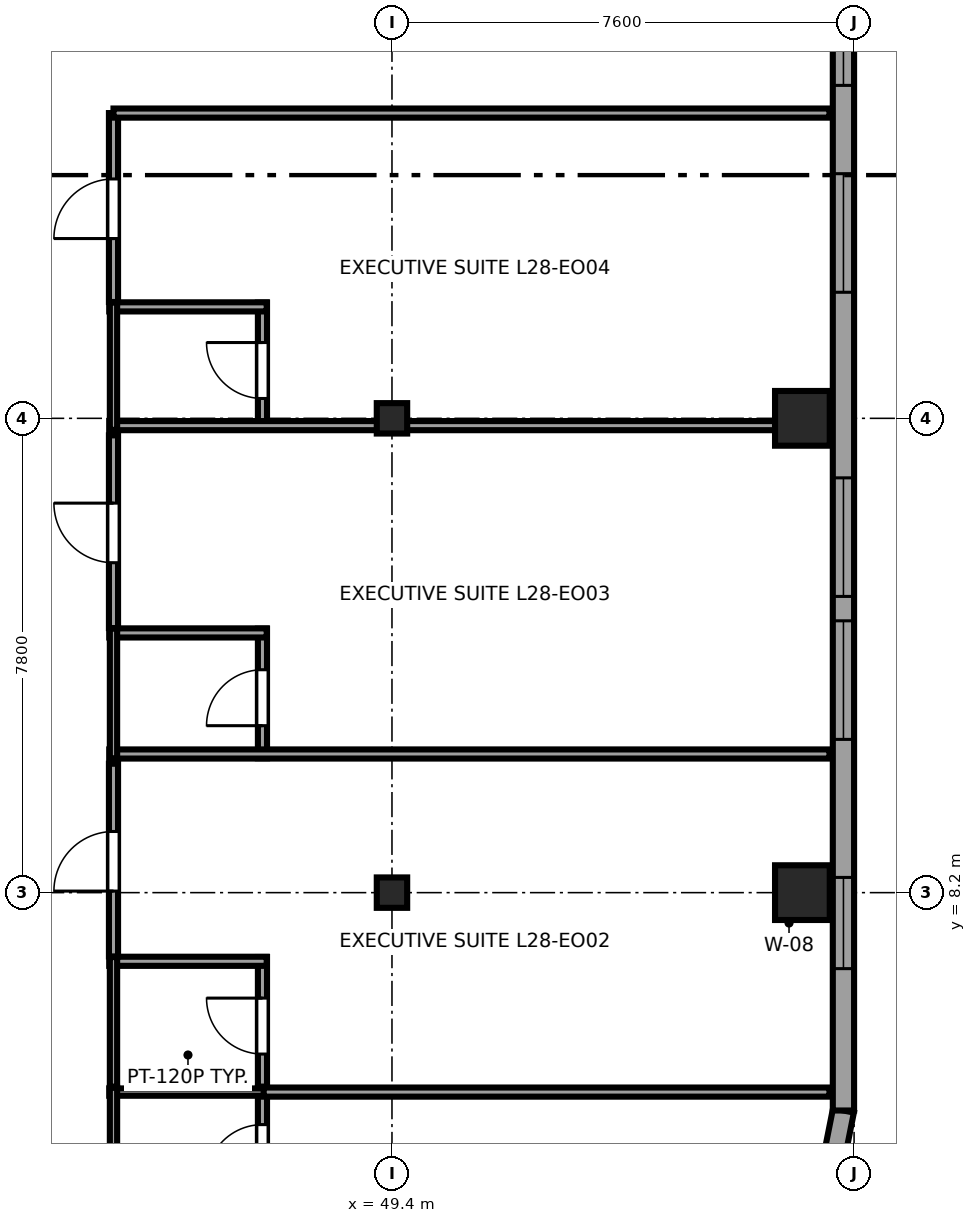
"""IFC4 building model, lengths in metres.
Left out: names, types, materials, properties, quantities, classifications, styles, units other than length and angle.
Written with IfcOpenShell. Run it as: python <this file> out.ifc"""

import sys

from ifc_helpers import new_model, si_unit, direction, frame, frame_2d, origin, origin_2d, place, context, subcontext, project, spatial, rectangle, i_section, extrude, source, transform, mapped, element, fill, save


model = new_model("IFC4")
c1 = context("Model", 3, precision=1e-05, world=origin(), true_north=direction((0.0, 1.0)))
c2 = subcontext(c1, "Body", "Model", "MODEL_VIEW")
j1 = project(units=[si_unit("LENGTHUNIT", "METRE"), si_unit("PLANEANGLEUNIT", "RADIAN")], contexts=[c1])
p1 = place(None, origin())
s1 = spatial("IfcSite", under=j1, at=p1, CompositionType="ELEMENT")
p2 = place(p1, origin())
s2 = spatial("IfcBuilding", under=s1, at=p2, CompositionType="ELEMENT")
p3 = place(p2, frame((0.0, 0.0, 111.55)))
s3 = spatial("IfcBuildingStorey", under=s2, at=p3, CompositionType="ELEMENT", Elevation=111.55)
m1 = source(origin(), c2, "Body", "SweptSolid", [
    extrude(i_section(OverallWidth=0.5, OverallDepth=0.5, WebThickness=0.022, FlangeThickness=0.034, at=origin_2d()), origin(), (0.0, 0.0, 1.0), 3.55),
])
for number, where, z_axis, x_axis in (
    (1, (49.4, 8.2, 0.0), (0.0, 0.0, 1.0), (1.0, 0.0, 0.0)),
    (2, (49.4, 16.0, 0.0), (0.0, 0.0, 1.0), (1.0, 0.0, 0.0)),
):
    element("IfcColumn", number, at=place(p3, frame(where, z_axis=z_axis, x_axis=x_axis)), inside=s3, PredefinedType="COLUMN", context=c2, shape_type="MappedRepresentation", body=[
        mapped(m1, transform((0.0, 0.0, 0.0), x_axis=(1.0, 0.0, 0.0), y_axis=(0.0, 1.0, 0.0), z_axis=(0.0, 0.0, 1.0), scale=1.0)),
    ])
m2 = source(origin(), c2, "Body", "SweptSolid", [
    extrude(rectangle(XDim=0.9, YDim=0.9, at=origin_2d()), origin(), (0.0, 0.0, 1.0), 3.55),
])
for number, where, z_axis, x_axis in (
    (3, (56.15, 8.2, 0.0), (0.0, 0.0, 1.0), (1.0, 0.0, 0.0)),
    (4, (56.15, 16.0, 0.0), (0.0, 0.0, 1.0), (1.0, 0.0, 0.0)),
):
    element("IfcColumn", number, at=place(p3, frame(where, z_axis=z_axis, x_axis=x_axis)), inside=s3, PredefinedType="COLUMN", context=c2, shape_type="MappedRepresentation", body=[
        mapped(m2, transform((0.0, 0.0, 0.0), x_axis=(1.0, 0.0, 0.0), y_axis=(0.0, 1.0, 0.0), z_axis=(0.0, 0.0, 1.0), scale=1.0)),
    ])
p4 = place(p3, frame((56.485, 2.908, 0.0), z_axis=(0.0, 0.0, 1.0), x_axis=(0.195011420161, 0.980800971659, 0.0)))
e5 = element("IfcWall", 5, at=p4, inside=s3, PredefinedType="SOLIDWALL", context=c2, shape_type="SweptSolid", body=[
    extrude(rectangle(XDim=1.743, YDim=0.35, at=frame_2d((0.871, 0.0))), origin(), (0.0, 0.0, 1.0), 3.37),
])
p5 = place(p3, frame((56.825, 4.617, 0.0), z_axis=(0.0, 0.0, 1.0), x_axis=(0.0, 1.0, 0.0)))
e6 = element("IfcWall", 6, at=p5, inside=s3, PredefinedType="SOLIDWALL", context=c2, shape_type="SweptSolid", body=[
    extrude(rectangle(XDim=36.766, YDim=0.35, at=frame_2d((18.383, 0.0))), origin(), (0.0, 0.0, 1.0), 3.37),
])
p6 = place(p5, frame((6.103, 0.0, 0.68)))
e7 = element("IfcOpeningElement", 7, at=p6, cuts=e6, PredefinedType="OPENING", context=c2, shape_type="SweptSolid", body=[
    extrude(rectangle(XDim=1.95, YDim=1.82, at=frame_2d((0.975, 0.91))), frame((0.0, 0.185, 0.0), z_axis=(0.0, -1.0, 0.0), x_axis=(1.0, 0.0, 0.0)), (0.0, 0.0, 1.0), 0.37),
])
p7 = place(p5, frame((8.454, 0.0, 0.68)))
e8 = element("IfcOpeningElement", 8, at=p7, cuts=e6, PredefinedType="OPENING", context=c2, shape_type="SweptSolid", body=[
    extrude(rectangle(XDim=1.95, YDim=1.82, at=frame_2d((0.975, 0.91))), frame((0.0, 0.185, 0.0), z_axis=(0.0, -1.0, 0.0), x_axis=(1.0, 0.0, 0.0)), (0.0, 0.0, 1.0), 0.37),
])
p8 = place(p5, frame((13.456, 0.0, 0.68)))
e9 = element("IfcOpeningElement", 9, at=p8, cuts=e6, PredefinedType="OPENING", context=c2, shape_type="SweptSolid", body=[
    extrude(rectangle(XDim=1.95, YDim=1.82, at=frame_2d((0.975, 0.91))), frame((0.0, 0.185, 0.0), z_axis=(0.0, -1.0, 0.0), x_axis=(1.0, 0.0, 0.0)), (0.0, 0.0, 1.0), 0.37),
])
p9 = place(p5, frame((16.858, 0.0, 0.68)))
e10 = element("IfcOpeningElement", 10, at=p9, cuts=e6, PredefinedType="OPENING", context=c2, shape_type="SweptSolid", body=[
    extrude(rectangle(XDim=1.95, YDim=1.82, at=frame_2d((0.975, 0.91))), frame((0.0, 0.185, 0.0), z_axis=(0.0, -1.0, 0.0), x_axis=(1.0, 0.0, 0.0)), (0.0, 0.0, 1.0), 0.37),
])
p10 = place(p5, frame((25.311, 0.0, 0.68)))
e11 = element("IfcOpeningElement", 11, at=p10, cuts=e6, PredefinedType="OPENING", context=c2, shape_type="SweptSolid", body=[
    extrude(rectangle(XDim=1.95, YDim=1.82, at=frame_2d((0.975, 0.91))), frame((0.0, 0.185, 0.0), z_axis=(0.0, -1.0, 0.0), x_axis=(1.0, 0.0, 0.0)), (0.0, 0.0, 1.0), 0.37),
])
p11 = place(p5, frame((2.333, 0.0, 0.62)))
e12 = element("IfcOpeningElement", 12, at=p11, cuts=e6, PredefinedType="OPENING", context=c2, shape_type="SweptSolid", body=[
    extrude(rectangle(XDim=1.5, YDim=1.55, at=frame_2d((0.75, 0.775))), frame((0.0, 0.185, 0.0), z_axis=(0.0, -1.0, 0.0), x_axis=(1.0, 0.0, 0.0)), (0.0, 0.0, 1.0), 0.37),
])
p12 = place(p3, frame((47.27, 3.0, 0.0), z_axis=(0.0, 0.0, 1.0), x_axis=(0.0, 1.0, 0.0)))
e13 = element("IfcWall", 13, at=p12, inside=s3, PredefinedType="PARTITIONING", context=c2, shape_type="SweptSolid", body=[
    extrude(rectangle(XDim=1.99, YDim=0.15, at=frame_2d((0.995, 0.0))), origin(), (0.0, 0.0, 1.0), 3.37),
])
p13 = place(p12, frame((0.465, 0.0, 0.0)))
e14 = element("IfcOpeningElement", 14, at=p13, cuts=e13, PredefinedType="OPENING", context=c2, shape_type="SweptSolid", body=[
    extrude(rectangle(XDim=0.92, YDim=2.01, at=frame_2d((0.46, 1.005))), frame((0.0, 0.085, 0.0), z_axis=(0.0, -1.0, 0.0), x_axis=(1.0, 0.0, 0.0)), (0.0, 0.0, 1.0), 0.17),
])
p14 = place(p3, frame((44.75, 4.92, 0.0), z_axis=(0.0, 0.0, 1.0), x_axis=(1.0, 0.0, 0.0)))
e15 = element("IfcWall", 15, at=p14, inside=s3, PredefinedType="PLUMBINGWALL", context=c2, shape_type="SweptSolid", body=[
    extrude(rectangle(XDim=2.59, YDim=0.12, at=frame_2d((1.295, 0.0))), origin(), (0.0, 0.0, 1.0), 3.37),
])
p15 = place(p3, frame((44.82, 3.0, 0.0), z_axis=(0.0, 0.0, 1.0), x_axis=(0.0, 1.0, 0.0)))
e16 = element("IfcWall", 16, at=p15, inside=s3, PredefinedType="PLUMBINGWALL", context=c2, shape_type="SweptSolid", body=[
    extrude(rectangle(XDim=1.99, YDim=0.12, at=frame_2d((0.995, 0.0))), origin(), (0.0, 0.0, 1.0), 3.37),
])
p16 = place(p3, frame((47.27, 5.01, 0.0), z_axis=(0.0, 0.0, 1.0), x_axis=(0.0, 1.0, 0.0)))
e17 = element("IfcWall", 17, at=p16, inside=s3, PredefinedType="PARTITIONING", context=c2, shape_type="SweptSolid", body=[
    extrude(rectangle(XDim=2.131, YDim=0.15, at=frame_2d((1.065, 0.0))), origin(), (0.0, 0.0, 1.0), 3.37),
])
p17 = place(p16, frame((0.535, 0.0, 0.0)))
e18 = element("IfcOpeningElement", 18, at=p17, cuts=e17, PredefinedType="OPENING", context=c2, shape_type="SweptSolid", body=[
    extrude(rectangle(XDim=0.92, YDim=2.01, at=frame_2d((0.46, 1.005))), frame((0.0, 0.085, 0.0), z_axis=(0.0, -1.0, 0.0), x_axis=(1.0, 0.0, 0.0)), (0.0, 0.0, 1.0), 0.17),
])
p18 = place(p3, frame((44.75, 7.071, 0.0), z_axis=(0.0, 0.0, 1.0), x_axis=(1.0, 0.0, 0.0)))
e19 = element("IfcWall", 19, at=p18, inside=s3, PredefinedType="PARTITIONING", context=c2, shape_type="SweptSolid", body=[
    extrude(rectangle(XDim=2.59, YDim=0.15, at=frame_2d((1.295, 0.0))), origin(), (0.0, 0.0, 1.0), 3.37),
])
p19 = place(p3, frame((44.82, 5.01, 0.0), z_axis=(0.0, 0.0, 1.0), x_axis=(0.0, 1.0, 0.0)))
e20 = element("IfcWall", 20, at=p19, inside=s3, PredefinedType="PLUMBINGWALL", context=c2, shape_type="SweptSolid", body=[
    extrude(rectangle(XDim=2.131, YDim=0.12, at=frame_2d((1.065, 0.0))), origin(), (0.0, 0.0, 1.0), 3.37),
])
p20 = place(p3, frame((47.27, 10.41, 0.0), z_axis=(0.0, 0.0, 1.0), x_axis=(0.0, 1.0, 0.0)))
e21 = element("IfcWall", 21, at=p20, inside=s3, PredefinedType="PARTITIONING", context=c2, shape_type="SweptSolid", body=[
    extrude(rectangle(XDim=2.131, YDim=0.15, at=frame_2d((1.065, 0.0))), origin(), (0.0, 0.0, 1.0), 3.37),
])
p21 = place(p20, frame((0.535, 0.0, 0.0)))
e22 = element("IfcOpeningElement", 22, at=p21, cuts=e21, PredefinedType="OPENING", context=c2, shape_type="SweptSolid", body=[
    extrude(rectangle(XDim=0.92, YDim=2.01, at=frame_2d((0.46, 1.005))), frame((0.0, 0.085, 0.0), z_axis=(0.0, -1.0, 0.0), x_axis=(1.0, 0.0, 0.0)), (0.0, 0.0, 1.0), 0.17),
])
p22 = place(p3, frame((44.75, 10.48, 0.0), z_axis=(0.0, 0.0, 1.0), x_axis=(1.0, 0.0, 0.0)))
e23 = element("IfcWall", 23, at=p22, inside=s3, PredefinedType="PARTITIONING", context=c2, shape_type="SweptSolid", body=[
    extrude(rectangle(XDim=11.845, YDim=0.15, at=frame_2d((5.922, 0.0))), origin(), (0.0, 0.0, 1.0), 3.37),
])
p23 = place(p3, frame((44.75, 12.471, 0.0), z_axis=(0.0, 0.0, 1.0), x_axis=(1.0, 0.0, 0.0)))
e24 = element("IfcWall", 24, at=p23, inside=s3, PredefinedType="PARTITIONING", context=c2, shape_type="SweptSolid", body=[
    extrude(rectangle(XDim=2.59, YDim=0.15, at=frame_2d((1.295, 0.0))), origin(), (0.0, 0.0, 1.0), 3.37),
])
p24 = place(p3, frame((44.82, 10.41, 0.0), z_axis=(0.0, 0.0, 1.0), x_axis=(0.0, 1.0, 0.0)))
e25 = element("IfcWall", 25, at=p24, inside=s3, PredefinedType="PLUMBINGWALL", context=c2, shape_type="SweptSolid", body=[
    extrude(rectangle(XDim=2.131, YDim=0.12, at=frame_2d((1.065, 0.0))), origin(), (0.0, 0.0, 1.0), 3.37),
])
p25 = place(p3, frame((47.27, 15.81, 0.0), z_axis=(0.0, 0.0, 1.0), x_axis=(0.0, 1.0, 0.0)))
e26 = element("IfcWall", 26, at=p25, inside=s3, PredefinedType="PARTITIONING", context=c2, shape_type="SweptSolid", body=[
    extrude(rectangle(XDim=2.093, YDim=0.15, at=frame_2d((1.046, 0.0))), origin(), (0.0, 0.0, 1.0), 3.37),
])
p26 = place(p25, frame((0.517, 0.0, 0.0)))
e27 = element("IfcOpeningElement", 27, at=p26, cuts=e26, PredefinedType="OPENING", context=c2, shape_type="SweptSolid", body=[
    extrude(rectangle(XDim=0.92, YDim=2.01, at=frame_2d((0.46, 1.005))), frame((0.0, 0.085, 0.0), z_axis=(0.0, -1.0, 0.0), x_axis=(1.0, 0.0, 0.0)), (0.0, 0.0, 1.0), 0.17),
])
p27 = place(p3, frame((44.75, 15.88, 0.0), z_axis=(0.0, 0.0, 1.0), x_axis=(1.0, 0.0, 0.0)))
e28 = element("IfcWall", 28, at=p27, inside=s3, PredefinedType="PARTITIONING", context=c2, shape_type="SweptSolid", body=[
    extrude(rectangle(XDim=11.845, YDim=0.15, at=frame_2d((5.922, 0.0))), origin(), (0.0, 0.0, 1.0), 2.748),
])
p28 = place(p3, frame((44.75, 17.833, 0.0), z_axis=(0.0, 0.0, 1.0), x_axis=(1.0, 0.0, 0.0)))
e29 = element("IfcWall", 29, at=p28, inside=s3, PredefinedType="PARTITIONING", context=c2, shape_type="SweptSolid", body=[
    extrude(rectangle(XDim=2.59, YDim=0.15, at=frame_2d((1.295, 0.0))), origin(), (0.0, 0.0, 1.0), 3.37),
])
p29 = place(p3, frame((44.82, 15.81, 0.0), z_axis=(0.0, 0.0, 1.0), x_axis=(0.0, 1.0, 0.0)))
e30 = element("IfcWall", 30, at=p29, inside=s3, PredefinedType="PLUMBINGWALL", context=c2, shape_type="SweptSolid", body=[
    extrude(rectangle(XDim=2.093, YDim=0.12, at=frame_2d((1.046, 0.0))), origin(), (0.0, 0.0, 1.0), 3.37),
])
p30 = place(p3, frame((47.29, 4.92, 0.0), z_axis=(0.0, 0.0, 1.0), x_axis=(1.0, 0.0, 0.0)))
e31 = element("IfcWall", 31, at=p30, inside=s3, PredefinedType="PARTITIONING", context=c2, shape_type="SweptSolid", body=[
    extrude(rectangle(XDim=9.305, YDim=0.15, at=frame_2d((4.652, 0.0))), origin(), (0.0, 0.0, 1.0), 3.37),
])
p31 = place(p3, frame((44.82, 7.151, 0.0), z_axis=(0.0, 0.0, 1.0), x_axis=(0.0, 1.0, 0.0)))
e32 = element("IfcWall", 32, at=p31, inside=s3, PredefinedType="PARTITIONING", context=c2, shape_type="SweptSolid", body=[
    extrude(rectangle(XDim=3.169, YDim=0.15, at=frame_2d((1.584, 0.0))), origin(), (0.0, 0.0, 1.0), 3.37),
])
p32 = place(p31, frame((1.074, 0.0, 0.0)))
e33 = element("IfcOpeningElement", 33, at=p32, cuts=e32, PredefinedType="OPENING", context=c2, shape_type="SweptSolid", body=[
    extrude(rectangle(XDim=0.98, YDim=2.12, at=frame_2d((0.49, 1.06))), frame((0.0, 0.085, 0.0), z_axis=(0.0, -1.0, 0.0), x_axis=(1.0, 0.0, 0.0)), (0.0, 0.0, 1.0), 0.17),
])
p33 = place(p3, frame((44.82, 12.551, 0.0), z_axis=(0.0, 0.0, 1.0), x_axis=(0.0, 1.0, 0.0)))
e34 = element("IfcWall", 34, at=p33, inside=s3, PredefinedType="PARTITIONING", context=c2, shape_type="SweptSolid", body=[
    extrude(rectangle(XDim=3.169, YDim=0.15, at=frame_2d((1.584, 0.0))), origin(), (0.0, 0.0, 1.0), 3.37),
])
p34 = place(p33, frame((1.074, 0.0, 0.0)))
e35 = element("IfcOpeningElement", 35, at=p34, cuts=e34, PredefinedType="OPENING", context=c2, shape_type="SweptSolid", body=[
    extrude(rectangle(XDim=0.98, YDim=2.12, at=frame_2d((0.49, 1.06))), frame((0.0, 0.085, 0.0), z_axis=(0.0, -1.0, 0.0), x_axis=(1.0, 0.0, 0.0)), (0.0, 0.0, 1.0), 0.17),
])
p35 = place(p3, frame((44.82, 17.913, 0.0), z_axis=(0.0, 0.0, 1.0), x_axis=(0.0, 1.0, 0.0)))
e36 = element("IfcWall", 36, at=p35, inside=s3, PredefinedType="PARTITIONING", context=c2, shape_type="SweptSolid", body=[
    extrude(rectangle(XDim=3.107, YDim=0.15, at=frame_2d((1.553, 0.0))), origin(), (0.0, 0.0, 1.0), 3.37),
])
p36 = place(p35, frame((1.043, 0.0, 0.0)))
e37 = element("IfcOpeningElement", 37, at=p36, cuts=e36, PredefinedType="OPENING", context=c2, shape_type="SweptSolid", body=[
    extrude(rectangle(XDim=0.98, YDim=2.12, at=frame_2d((0.49, 1.06))), frame((0.0, 0.085, 0.0), z_axis=(0.0, -1.0, 0.0), x_axis=(1.0, 0.0, 0.0)), (0.0, 0.0, 1.0), 0.17),
])
p37 = place(p3, frame((44.82, 21.02, 0.0), z_axis=(0.0, 0.0, 1.0), x_axis=(1.0, 0.0, 0.0)))
e38 = element("IfcWall", 38, at=p37, inside=s3, PredefinedType="PARTITIONING", context=c2, shape_type="SweptSolid", body=[
    extrude(rectangle(XDim=11.775, YDim=0.15, at=frame_2d((5.887, 0.0))), origin(), (0.0, 0.0, 1.0), 3.37),
])
m3 = source(origin(), c2, "Body", "SweptSolid", [
    extrude(rectangle(XDim=1.95, YDim=1.82, at=frame_2d((0.975, 0.91))), frame((0.0, 0.09, 0.0), z_axis=(0.0, -1.0, 0.0), x_axis=(1.0, 0.0, 0.0)), (0.0, 0.0, 1.0), 0.06),
])
p38 = place(p6, origin())
e39 = element("IfcWindow", 39, at=p38, inside=s3, PartitioningType="DOUBLE_PANEL_VERTICAL", PredefinedType="WINDOW", context=c2, shape_type="MappedRepresentation", body=[
    mapped(m3, transform((0.0, 0.0, 0.0), x_axis=(1.0, 0.0, 0.0), y_axis=(0.0, 1.0, 0.0), z_axis=(0.0, 0.0, 1.0), scale=1.0)),
])
fill(e7, e39)
p39 = place(p7, origin())
e40 = element("IfcWindow", 40, at=p39, inside=s3, PartitioningType="DOUBLE_PANEL_VERTICAL", PredefinedType="WINDOW", context=c2, shape_type="MappedRepresentation", body=[
    mapped(m3, transform((0.0, 0.0, 0.0), x_axis=(1.0, 0.0, 0.0), y_axis=(0.0, 1.0, 0.0), z_axis=(0.0, 0.0, 1.0), scale=1.0)),
])
fill(e8, e40)
p40 = place(p8, origin())
e41 = element("IfcWindow", 41, at=p40, inside=s3, PartitioningType="DOUBLE_PANEL_VERTICAL", PredefinedType="WINDOW", context=c2, shape_type="MappedRepresentation", body=[
    mapped(m3, transform((0.0, 0.0, 0.0), x_axis=(1.0, 0.0, 0.0), y_axis=(0.0, 1.0, 0.0), z_axis=(0.0, 0.0, 1.0), scale=1.0)),
])
fill(e9, e41)
p41 = place(p9, origin())
e42 = element("IfcWindow", 42, at=p41, inside=s3, PartitioningType="DOUBLE_PANEL_VERTICAL", PredefinedType="WINDOW", context=c2, shape_type="MappedRepresentation", body=[
    mapped(m3, transform((0.0, 0.0, 0.0), x_axis=(1.0, 0.0, 0.0), y_axis=(0.0, 1.0, 0.0), z_axis=(0.0, 0.0, 1.0), scale=1.0)),
])
fill(e10, e42)
m4 = source(origin(), c2, "Body", "SweptSolid", [
    extrude(rectangle(XDim=1.5, YDim=1.55, at=frame_2d((0.75, 0.775))), frame((0.0, 0.09, 0.0), z_axis=(0.0, -1.0, 0.0), x_axis=(1.0, 0.0, 0.0)), (0.0, 0.0, 1.0), 0.06),
])
p42 = place(p11, origin())
e43 = element("IfcWindow", 43, at=p42, inside=s3, PartitioningType="SINGLE_PANEL", PredefinedType="WINDOW", context=c2, shape_type="MappedRepresentation", body=[
    mapped(m4, transform((0.0, 0.0, 0.0), x_axis=(1.0, 0.0, 0.0), y_axis=(0.0, 1.0, 0.0), z_axis=(0.0, 0.0, 1.0), scale=1.0)),
])
fill(e12, e43)
m5 = source(origin(), c2, "Body", "SweptSolid", [
    extrude(rectangle(XDim=0.92, YDim=2.01, at=frame_2d((0.46, 1.005))), frame((0.0, 0.025, 0.0), z_axis=(0.0, -1.0, 0.0), x_axis=(1.0, 0.0, 0.0)), (0.0, 0.0, 1.0), 0.05),
])
p43 = place(p13, origin())
e44 = element("IfcDoor", 44, at=p43, inside=s3, OperationType="SINGLE_SWING_LEFT", PredefinedType="DOOR", context=c2, shape_type="MappedRepresentation", body=[
    mapped(m5, transform((0.0, 0.0, 0.0), x_axis=(1.0, 0.0, 0.0), y_axis=(0.0, 1.0, 0.0), z_axis=(0.0, 0.0, 1.0), scale=1.0)),
])
fill(e14, e44)
p44 = place(p17, origin())
e45 = element("IfcDoor", 45, at=p44, inside=s3, OperationType="SINGLE_SWING_RIGHT", PredefinedType="DOOR", context=c2, shape_type="MappedRepresentation", body=[
    mapped(m5, transform((0.0, 0.0, 0.0), x_axis=(1.0, 0.0, 0.0), y_axis=(0.0, 1.0, 0.0), z_axis=(0.0, 0.0, 1.0), scale=1.0)),
])
fill(e18, e45)
p45 = place(p21, origin())
e46 = element("IfcDoor", 46, at=p45, inside=s3, OperationType="SINGLE_SWING_LEFT", PredefinedType="DOOR", context=c2, shape_type="MappedRepresentation", body=[
    mapped(m5, transform((0.0, 0.0, 0.0), x_axis=(1.0, 0.0, 0.0), y_axis=(0.0, 1.0, 0.0), z_axis=(0.0, 0.0, 1.0), scale=1.0)),
])
fill(e22, e46)
p46 = place(p26, origin())
e47 = element("IfcDoor", 47, at=p46, inside=s3, OperationType="SINGLE_SWING_RIGHT", PredefinedType="DOOR", context=c2, shape_type="MappedRepresentation", body=[
    mapped(m5, transform((0.0, 0.0, 0.0), x_axis=(1.0, 0.0, 0.0), y_axis=(0.0, 1.0, 0.0), z_axis=(0.0, 0.0, 1.0), scale=1.0)),
])
fill(e27, e47)
m6 = source(origin(), c2, "Body", "SweptSolid", [
    extrude(rectangle(XDim=0.98, YDim=2.12, at=frame_2d((0.49, 1.06))), frame((0.0, 0.025, 0.0), z_axis=(0.0, -1.0, 0.0), x_axis=(1.0, 0.0, 0.0)), (0.0, 0.0, 1.0), 0.05),
])
p47 = place(p32, origin())
e48 = element("IfcDoor", 48, at=p47, inside=s3, OperationType="SINGLE_SWING_LEFT", PredefinedType="DOOR", context=c2, shape_type="MappedRepresentation", body=[
    mapped(m6, transform((0.0, 0.0, 0.0), x_axis=(1.0, 0.0, 0.0), y_axis=(0.0, 1.0, 0.0), z_axis=(0.0, 0.0, 1.0), scale=1.0)),
])
fill(e33, e48)
p48 = place(p34, origin())
e49 = element("IfcDoor", 49, at=p48, inside=s3, OperationType="SINGLE_SWING_RIGHT", PredefinedType="DOOR", context=c2, shape_type="MappedRepresentation", body=[
    mapped(m6, transform((0.0, 0.0, 0.0), x_axis=(1.0, 0.0, 0.0), y_axis=(0.0, 1.0, 0.0), z_axis=(0.0, 0.0, 1.0), scale=1.0)),
])
fill(e35, e49)
p49 = place(p36, origin())
e50 = element("IfcDoor", 50, at=p49, inside=s3, OperationType="SINGLE_SWING_LEFT", PredefinedType="DOOR", context=c2, shape_type="MappedRepresentation", body=[
    mapped(m6, transform((0.0, 0.0, 0.0), x_axis=(1.0, 0.0, 0.0), y_axis=(0.0, 1.0, 0.0), z_axis=(0.0, 0.0, 1.0), scale=1.0)),
])
fill(e37, e50)
save(model, sys.argv[1])
